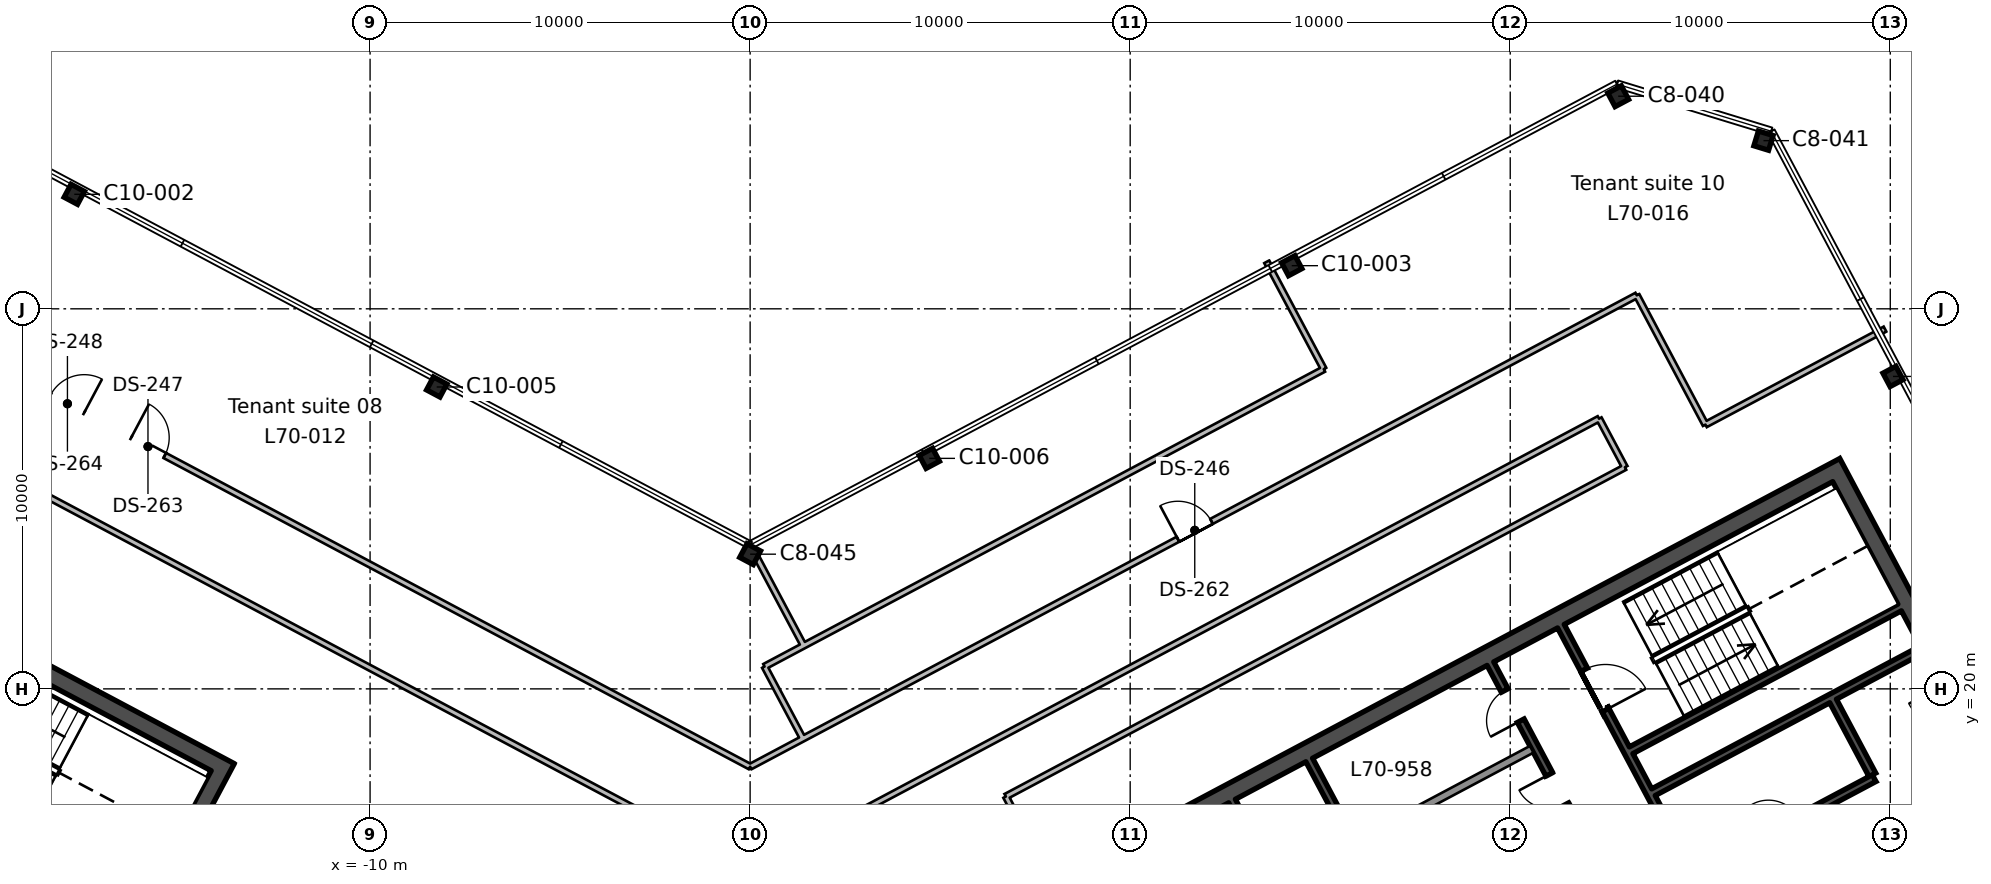
"""IFC4 building model, lengths in metres.
Left out: names, types, materials, properties, quantities, classifications, styles, units other than length and angle.
Written with IfcOpenShell. Run it as: python <this file> out.ifc"""

import sys

from ifc_helpers import new_model, si_unit, direction, frame, frame_2d, origin, origin_2d, place, context, subcontext, project, spatial, rectangle, i_section, extrude, element, fill, save


model = new_model("IFC4")
c1 = context("Model", 3, precision=1e-05, world=origin(), true_north=direction((0.0, 1.0)))
c2 = subcontext(c1, "Body", "Model", "MODEL_VIEW")
j1 = project(units=[si_unit("LENGTHUNIT", "METRE"), si_unit("PLANEANGLEUNIT", "RADIAN")], contexts=[c1])
p1 = place(None, origin())
s1 = spatial("IfcSite", under=j1, at=p1, CompositionType="ELEMENT")
p2 = place(p1, origin())
s2 = spatial("IfcBuilding", under=s1, at=p2, CompositionType="ELEMENT")
p3 = place(p2, frame((0.0, 0.0, 308.7)))
s3 = spatial("IfcBuildingStorey", under=s2, at=p3, CompositionType="ELEMENT", Elevation=308.7)
p4 = place(p3, frame((0.0, 23.544, 0.0), z_axis=(0.0, 0.0, 1.0), x_axis=(-0.882947592859, 0.469471562786, 0.0)))
e1 = element("IfcColumn", 1, at=p4, inside=s3, PredefinedType="COLUMN", context=c2, shape_type="SweptSolid", body=[
    extrude(i_section(OverallWidth=0.404, OverallDepth=0.406, WebThickness=0.027, FlangeThickness=0.044, FilletRadius=0.015, at=origin_2d()), origin(), (0.0, 0.0, 1.0), 3.9),
])
for number, where, z_axis, x_axis in (
    (2, (4.715, 26.065, 0.0), (0.0, 0.0, 1.0), (-0.883, -0.469, 0.0)),
    (3, (-8.247, 27.943, 0.0), (0.0, 0.0, 1.0), (-0.883, 0.469, 0.0)),
    (4, (30.071, 28.221, 0.0), (0.0, 0.0, 1.0), (-0.469, 0.883, 0.0)),
    (5, (14.251, 31.135, 0.0), (0.0, 0.0, 1.0), (-0.883, -0.469, 0.0)),
    (6, (-17.783, 33.013, 0.0), (0.0, 0.0, 1.0), (-0.883, 0.469, 0.0)),
):
    element("IfcColumn", number, at=place(p3, frame(where, z_axis=z_axis, x_axis=x_axis)), inside=s3, PredefinedType="COLUMN", context=c2, shape_type="SweptSolid", body=[
        extrude(i_section(OverallWidth=0.399, OverallDepth=0.386, WebThickness=0.021, FlangeThickness=0.033, FilletRadius=0.015, at=origin_2d()), origin(), (0.0, 0.0, 1.0), 3.9),
    ])
for number, where, z_axis, x_axis in (
    (7, (26.664, 34.425, 0.0), (0.0, 0.0, 1.0), (-0.956, 0.292, 0.0)),
    (8, (22.841, 35.594, 0.0), (0.0, 0.0, 1.0), (-0.883, -0.469, 0.0)),
):
    element("IfcColumn", number, at=place(p3, frame(where, z_axis=z_axis, x_axis=x_axis)), inside=s3, PredefinedType="COLUMN", context=c2, shape_type="SweptSolid", body=[
        extrude(i_section(OverallWidth=0.404, OverallDepth=0.406, WebThickness=0.027, FlangeThickness=0.044, FilletRadius=0.015, at=origin_2d()), origin(), (0.0, 0.0, 1.0), 3.9),
    ])
p5 = place(p3, frame((-13.771, 18.138, 0.0), z_axis=(0.0, 0.0, 1.0), x_axis=(-0.469467968382, -0.882949504028, 0.0)))
e9 = element("IfcWall", 9, at=p5, inside=s3, PredefinedType="SHEAR", context=c2, shape_type="SweptSolid", body=[
    extrude(rectangle(XDim=19.1, YDim=0.45, at=frame_2d((9.55, 0.0))), origin(), (0.0, 0.0, 1.0), 3.9),
])
p6 = place(p5, frame((6.55, 0.0, 0.0)))
e10 = element("IfcOpeningElement", 10, at=p6, cuts=e9, PredefinedType="OPENING", context=c2, shape_type="SweptSolid", body=[
    extrude(rectangle(XDim=2.4, YDim=2.4, at=frame_2d((1.2, 1.2))), frame((0.0, 0.235, 0.0), z_axis=(0.0, -1.0, 0.0), x_axis=(1.0, 0.0, 0.0)), (0.0, 0.0, 1.0), 0.47),
])
p7 = place(p3, frame((-14.076, 18.045, 0.0), z_axis=(0.0, 0.0, 1.0), x_axis=(-0.882947755831, 0.46947125628, 0.0)))
e11 = element("IfcWall", 11, at=p7, inside=s3, PredefinedType="SHEAR", context=c2, shape_type="SweptSolid", body=[
    extrude(rectangle(XDim=20.2, YDim=0.45, at=frame_2d((10.1, 0.0))), origin(), (0.0, 0.0, 1.0), 3.9),
])
p8 = place(p3, frame((-15.942, 14.536, 0.0), z_axis=(0.0, 0.0, 1.0), x_axis=(-0.882946947542, 0.469472776449, 0.0)))
e12 = element("IfcWall", 12, at=p8, inside=s3, PredefinedType="SHEAR", context=c2, shape_type="SweptSolid", body=[
    extrude(rectangle(XDim=8.0, YDim=0.2, at=frame_2d((4.0, 0.0))), origin(), (0.0, 0.0, 1.0), 3.9),
])
p9 = place(p3, frame((-16.529, 13.432, 0.0), z_axis=(0.0, 0.0, 1.0), x_axis=(-0.88295287151, 0.469461634952, 0.0)))
e13 = element("IfcWall", 13, at=p9, inside=s3, PredefinedType="SHEAR", context=c2, shape_type="SweptSolid", body=[
    extrude(rectangle(XDim=8.0, YDim=0.2, at=frame_2d((4.0, 0.0))), origin(), (0.0, 0.0, 1.0), 3.9),
])
p10 = place(p3, frame((37.439, 9.091, 0.0), z_axis=(0.0, 0.0, 1.0), x_axis=(-0.469467968382, 0.882949504028, 0.0)))
e14 = element("IfcWall", 14, at=p10, inside=s3, PredefinedType="SHEAR", context=c2, shape_type="SweptSolid", body=[
    extrude(rectangle(XDim=19.1, YDim=0.45, at=frame_2d((9.55, 0.0))), origin(), (0.0, 0.0, 1.0), 3.9),
])
p11 = place(p10, frame((10.15, 0.0, 0.0)))
e15 = element("IfcOpeningElement", 15, at=p11, cuts=e14, PredefinedType="OPENING", context=c2, shape_type="SweptSolid", body=[
    extrude(rectangle(XDim=2.4, YDim=2.4, at=frame_2d((1.2, 1.2))), frame((0.0, 0.235, 0.0), z_axis=(0.0, -1.0, 0.0), x_axis=(1.0, 0.0, 0.0)), (0.0, 0.0, 1.0), 0.47),
])
p12 = place(p3, frame((10.544, 16.167, 0.0), z_axis=(0.0, 0.0, 1.0), x_axis=(0.882947755831, 0.46947125628, 0.0)))
e16 = element("IfcWall", 16, at=p12, inside=s3, PredefinedType="SHEAR", context=c2, shape_type="SweptSolid", body=[
    extrude(rectangle(XDim=20.2, YDim=0.45, at=frame_2d((10.1, 0.0))), origin(), (0.0, 0.0, 1.0), 3.9),
])
p13 = place(p3, frame((14.394, 13.826, 0.0), z_axis=(0.0, 0.0, 1.0), x_axis=(-0.469494272526, 0.882935517501, 0.0)))
e17 = element("IfcWall", 17, at=p13, inside=s3, PredefinedType="SHEAR", context=c2, shape_type="SweptSolid", body=[
    extrude(rectangle(XDim=3.65, YDim=0.2, at=frame_2d((1.825, 0.0))), origin(), (0.0, 0.0, 1.0), 3.9),
])
p14 = place(p3, frame((18.138, 11.683, 0.0), z_axis=(0.0, 0.0, 1.0), x_axis=(-0.469480409012, 0.88294288918, 0.0)))
e18 = element("IfcWall", 18, at=p14, inside=s3, PredefinedType="SHEAR", context=c2, shape_type="SweptSolid", body=[
    extrude(rectangle(XDim=7.3, YDim=0.2, at=frame_2d((3.65, 0.0))), origin(), (0.0, 0.0, 1.0), 3.9),
])
p15 = place(p3, frame((22.906, 14.218, 0.0), z_axis=(0.0, 0.0, 1.0), x_axis=(-0.469480409012, 0.88294288918, 0.0)))
e19 = element("IfcWall", 19, at=p15, inside=s3, PredefinedType="SHEAR", context=c2, shape_type="SweptSolid", body=[
    extrude(rectangle(XDim=7.3, YDim=0.2, at=frame_2d((3.65, 0.0))), origin(), (0.0, 0.0, 1.0), 3.9),
])
p16 = place(p15, frame((3.1, 0.0, 0.0)))
e20 = element("IfcOpeningElement", 20, at=p16, cuts=e19, PredefinedType="OPENING", context=c2, shape_type="SweptSolid", body=[
    extrude(rectangle(XDim=0.9, YDim=2.1, at=frame_2d((0.45, 1.05))), frame((0.0, 0.11, 0.0), z_axis=(0.0, -1.0, 0.0), x_axis=(1.0, 0.0, 0.0)), (0.0, 0.0, 1.0), 0.22),
])
p17 = place(p15, frame((5.6, 0.0, 0.0)))
e21 = element("IfcOpeningElement", 21, at=p17, cuts=e19, PredefinedType="OPENING", context=c2, shape_type="SweptSolid", body=[
    extrude(rectangle(XDim=0.9, YDim=2.1, at=frame_2d((0.45, 1.05))), frame((0.0, 0.11, 0.0), z_axis=(0.0, -1.0, 0.0), x_axis=(1.0, 0.0, 0.0)), (0.0, 0.0, 1.0), 0.22),
])
p18 = place(p3, frame((24.76, 15.204, 0.0), z_axis=(0.0, 0.0, 1.0), x_axis=(-0.469494272526, 0.882935517501, 0.0)))
e22 = element("IfcWall", 22, at=p18, inside=s3, PredefinedType="SHEAR", context=c2, shape_type="SweptSolid", body=[
    extrude(rectangle(XDim=7.3, YDim=0.2, at=frame_2d((3.65, 0.0))), origin(), (0.0, 0.0, 1.0), 3.9),
])
p19 = place(p18, frame((4.8, 0.0, 0.0)))
e23 = element("IfcOpeningElement", 23, at=p19, cuts=e22, PredefinedType="OPENING", context=c2, shape_type="SweptSolid", body=[
    extrude(rectangle(XDim=1.2, YDim=2.1, at=frame_2d((0.6, 1.05))), frame((0.0, 0.11, 0.0), z_axis=(0.0, -1.0, 0.0), x_axis=(1.0, 0.0, 0.0)), (0.0, 0.0, 1.0), 0.22),
])
p20 = place(p3, frame((29.528, 17.739, 0.0), z_axis=(0.0, 0.0, 1.0), x_axis=(-0.469401318492, 0.882984938828, 0.0)))
e24 = element("IfcWall", 24, at=p20, inside=s3, PredefinedType="SHEAR", context=c2, shape_type="SweptSolid", body=[
    extrude(rectangle(XDim=2.2, YDim=0.2, at=frame_2d((1.1, 0.0))), origin(), (0.0, 0.0, 1.0), 3.9),
])
p21 = place(p3, frame((24.807, 15.116, 0.0), z_axis=(0.0, 0.0, 1.0), x_axis=(0.882942972946, 0.469480251476, 0.0)))
e25 = element("IfcWall", 25, at=p21, inside=s3, PredefinedType="SHEAR", context=c2, shape_type="SweptSolid", body=[
    extrude(rectangle(XDim=5.4, YDim=0.2, at=frame_2d((2.7, 0.0))), origin(), (0.0, 0.0, 1.0), 3.9),
])
p22 = place(p21, frame((2.25, 0.0, 0.0)))
e26 = element("IfcOpeningElement", 26, at=p22, cuts=e25, PredefinedType="OPENING", context=c2, shape_type="SweptSolid", body=[
    extrude(rectangle(XDim=0.9, YDim=2.1, at=frame_2d((0.45, 1.05))), frame((0.0, 0.11, 0.0), z_axis=(0.0, -1.0, 0.0), x_axis=(1.0, 0.0, 0.0)), (0.0, 0.0, 1.0), 0.22),
])
p23 = place(p3, frame((23.769, 17.282, 0.0), z_axis=(0.0, 0.0, 1.0), x_axis=(0.882940221191, 0.469485426614, 0.0)))
e27 = element("IfcWall", 27, at=p23, inside=s3, PredefinedType="SHEAR", context=c2, shape_type="SweptSolid", body=[
    extrude(rectangle(XDim=8.0, YDim=0.2, at=frame_2d((4.0, 0.0))), origin(), (0.0, 0.0, 1.0), 3.9),
])
p24 = place(p3, frame((23.182, 18.385, 0.0), z_axis=(0.0, 0.0, 1.0), x_axis=(0.88295287151, 0.469461634952, 0.0)))
e28 = element("IfcWall", 28, at=p24, inside=s3, PredefinedType="SHEAR", context=c2, shape_type="SweptSolid", body=[
    extrude(rectangle(XDim=8.0, YDim=0.2, at=frame_2d((4.0, 0.0))), origin(), (0.0, 0.0, 1.0), 3.9),
])
p25 = place(p3, frame((15.973, 15.968, 0.0), z_axis=(0.0, 0.0, 1.0), x_axis=(0.882953967957, 0.469459572775, 0.0)))
e29 = element("IfcWall", 29, at=p25, inside=s3, PredefinedType="SOLIDWALL", context=c2, shape_type="SweptSolid", body=[
    extrude(rectangle(XDim=5.2, YDim=0.2, at=frame_2d((2.6, 0.0))), origin(), (0.0, 0.0, 1.0), 3.9),
])
p26 = place(p3, frame((-32.541, 32.535, 0.0), z_axis=(0.0, 0.0, 1.0), x_axis=(0.882951675281, -0.469463884787, 0.0)))
e30 = element("IfcWall", 30, at=p26, inside=s3, PredefinedType="PARTITIONING", context=c2, shape_type="SweptSolid", body=[
    extrude(rectangle(XDim=36.855, YDim=0.15, at=frame_2d((18.427, 0.0))), origin(), (0.0, 0.0, 1.0), 3.54),
])
p27 = place(p3, frame((0.0, 15.233, 0.0), z_axis=(0.0, 0.0, 1.0), x_axis=(0.882940229487, 0.469485411012, 0.0)))
e31 = element("IfcWall", 31, at=p27, inside=s3, PredefinedType="PARTITIONING", context=c2, shape_type="SweptSolid", body=[
    extrude(rectangle(XDim=25.298, YDim=0.15, at=frame_2d((12.649, 0.0))), origin(), (0.0, 0.0, 1.0), 3.54),
])
p28 = place(p3, frame((22.337, 27.11, 0.0), z_axis=(0.0, 0.0, 1.0), x_axis=(0.46976654726, -0.882790683614, 0.0)))
e32 = element("IfcWall", 32, at=p28, inside=s3, PredefinedType="PARTITIONING", context=c2, shape_type="SweptSolid", body=[
    extrude(rectangle(XDim=1.45, YDim=0.15, at=frame_2d((0.725, 0.0))), origin(), (0.0, 0.0, 1.0), 3.54),
])
p29 = place(p3, frame((23.018, 25.83, 0.0), z_axis=(0.0, 0.0, 1.0), x_axis=(-0.882935416105, -0.469494463213, 0.0)))
e33 = element("IfcWall", 33, at=p29, inside=s3, PredefinedType="PARTITIONING", context=c2, shape_type="SweptSolid", body=[
    extrude(rectangle(XDim=18.45, YDim=0.15, at=frame_2d((9.225, 0.0))), origin(), (0.0, 0.0, 1.0), 3.54),
])
p30 = place(p3, frame((6.728, 17.168, 0.0), z_axis=(0.0, 0.0, 1.0), x_axis=(0.469325262013, -0.883025366813, 0.0)))
e34 = element("IfcWall", 34, at=p30, inside=s3, PredefinedType="PARTITIONING", context=c2, shape_type="SweptSolid", body=[
    extrude(rectangle(XDim=3.814, YDim=0.15, at=frame_2d((1.907, 0.0))), origin(), (0.0, 0.0, 1.0), 3.54),
])
p31 = place(p3, frame((-31.693, 34.803, 0.0), z_axis=(0.0, 0.0, 1.0), x_axis=(0.882941558982, -0.469482910683, 0.0)))
e35 = element("IfcWall", 35, at=p31, inside=s3, PredefinedType="PARTITIONING", context=c2, shape_type="SweptSolid", body=[
    extrude(rectangle(XDim=35.895, YDim=0.15, at=frame_2d((17.948, 0.0))), origin(), (0.0, 0.0, 1.0), 3.54),
])
p32 = place(p31, frame((17.45, 0.0, 0.0)))
e36 = element("IfcOpeningElement", 36, at=p32, cuts=e35, PredefinedType="OPENING", context=c2, shape_type="SweptSolid", body=[
    extrude(rectangle(XDim=1.0, YDim=2.1, at=frame_2d((0.5, 1.05))), frame((0.0, 0.085, 0.0), z_axis=(0.0, -1.0, 0.0), x_axis=(1.0, 0.0, 0.0)), (0.0, 0.0, 1.0), 0.17),
])
p33 = place(p31, frame((15.05, 0.0, 0.0)))
e37 = element("IfcOpeningElement", 37, at=p33, cuts=e35, PredefinedType="OPENING", context=c2, shape_type="SweptSolid", body=[
    extrude(rectangle(XDim=1.0, YDim=2.1, at=frame_2d((0.5, 1.05))), frame((0.0, 0.085, 0.0), z_axis=(0.0, -1.0, 0.0), x_axis=(1.0, 0.0, 0.0)), (0.0, 0.0, 1.0), 0.17),
])
p34 = place(p3, frame((0.0, 17.951, 0.0), z_axis=(0.0, 0.0, 1.0), x_axis=(0.882944349917, 0.469477661821, 0.0)))
e38 = element("IfcWall", 38, at=p34, inside=s3, PredefinedType="PARTITIONING", context=c2, shape_type="SweptSolid", body=[
    extrude(rectangle(XDim=26.423, YDim=0.15, at=frame_2d((13.211, 0.0))), origin(), (0.0, 0.0, 1.0), 3.54),
])
p35 = place(p34, frame((12.75, 0.0, 0.0)))
e39 = element("IfcOpeningElement", 39, at=p35, cuts=e38, PredefinedType="OPENING", context=c2, shape_type="SweptSolid", body=[
    extrude(rectangle(XDim=1.0, YDim=2.1, at=frame_2d((0.5, 1.05))), frame((0.0, 0.085, 0.0), z_axis=(0.0, -1.0, 0.0), x_axis=(1.0, 0.0, 0.0)), (0.0, 0.0, 1.0), 0.17),
])
p36 = place(p3, frame((-14.844, 31.903, 0.0), z_axis=(0.0, 0.0, 1.0), x_axis=(-0.469344284682, -0.883015256061, 0.0)))
e40 = element("IfcWall", 40, at=p36, inside=s3, PredefinedType="PARTITIONING", context=c2, shape_type="SweptSolid", body=[
    extrude(rectangle(XDim=5.35, YDim=0.15, at=frame_2d((2.675, 0.0))), origin(), (0.0, 0.0, 1.0), 3.54),
])
p37 = place(p3, frame((0.178, 23.45, 0.0), z_axis=(0.0, 0.0, 1.0), x_axis=(0.469495603372, -0.882934809833, 0.0)))
e41 = element("IfcWall", 41, at=p37, inside=s3, PredefinedType="PARTITIONING", context=c2, shape_type="SweptSolid", body=[
    extrude(rectangle(XDim=2.622, YDim=0.15, at=frame_2d((1.311, 0.0))), origin(), (0.0, 0.0, 1.0), 3.54),
])
p38 = place(p3, frame((1.404, 21.133, 0.0), z_axis=(0.0, 0.0, 1.0), x_axis=(-0.882568125156, -0.47018454298, 0.0)))
e42 = element("IfcWall", 42, at=p38, inside=s3, PredefinedType="PARTITIONING", context=c2, shape_type="SweptSolid", body=[
    extrude(rectangle(XDim=1.162, YDim=0.15, at=frame_2d((0.581, 0.0))), origin(), (0.0, 0.0, 1.0), 3.54),
])
p39 = place(p3, frame((1.36, 18.742, 0.0), z_axis=(0.0, 0.0, 1.0), x_axis=(-0.469357296394, 0.883008339894, 0.0)))
e43 = element("IfcWall", 43, at=p39, inside=s3, PredefinedType="PARTITIONING", context=c2, shape_type="SweptSolid", body=[
    extrude(rectangle(XDim=2.091, YDim=0.15, at=frame_2d((1.045, 0.0))), origin(), (0.0, 0.0, 1.0), 3.54),
])
p40 = place(p3, frame((1.404, 21.133, 0.0), z_axis=(0.0, 0.0, 1.0), x_axis=(0.882961961034, 0.469444539182, 0.0)))
e44 = element("IfcWall", 44, at=p40, inside=s3, PredefinedType="PARTITIONING", context=c2, shape_type="SweptSolid", body=[
    extrude(rectangle(XDim=15.506, YDim=0.15, at=frame_2d((7.753, 0.0))), origin(), (0.0, 0.0, 1.0), 3.54),
])
p41 = place(p3, frame((15.095, 28.412, 0.0), z_axis=(0.0, 0.0, 1.0), x_axis=(-0.469320691295, 0.883027796121, 0.0)))
e45 = element("IfcWall", 45, at=p41, inside=s3, PredefinedType="PARTITIONING", context=c2, shape_type="SweptSolid", body=[
    extrude(rectangle(XDim=3.2, YDim=0.15, at=frame_2d((1.6, 0.0))), origin(), (0.0, 0.0, 1.0), 3.54),
])
p42 = place(p3, frame((29.862, 29.466, 0.0), z_axis=(0.0, 0.0, 1.0), x_axis=(-0.882849858528, -0.469655328191, 0.0)))
e46 = element("IfcWall", 46, at=p42, inside=s3, PredefinedType="PARTITIONING", context=c2, shape_type="SweptSolid", body=[
    extrude(rectangle(XDim=5.353, YDim=0.15, at=frame_2d((2.677, 0.0))), origin(), (0.0, 0.0, 1.0), 3.54),
])
p43 = place(p3, frame((25.136, 26.952, 0.0), z_axis=(0.0, 0.0, 1.0), x_axis=(-0.468650225043, 0.883383816111, 0.0)))
e47 = element("IfcWall", 47, at=p43, inside=s3, PredefinedType="PARTITIONING", context=c2, shape_type="SweptSolid", body=[
    extrude(rectangle(XDim=3.854, YDim=0.15, at=frame_2d((1.927, 0.0))), origin(), (0.0, 0.0, 1.0), 3.54),
])
p44 = place(p19, frame((1.2, 0.0, 0.0), z_axis=(0.0, 0.0, 1.0), x_axis=(-1.0, 0.0, 0.0)))
e48 = element("IfcDoor", 48, at=p44, inside=s3, OperationType="SINGLE_SWING_RIGHT", PredefinedType="DOOR", context=c2, shape_type="SweptSolid", body=[
    extrude(rectangle(XDim=1.2, YDim=2.1, at=frame_2d((0.6, 1.05))), frame((0.0, 0.025, 0.0), z_axis=(0.0, -1.0, 0.0), x_axis=(1.0, 0.0, 0.0)), (0.0, 0.0, 1.0), 0.05),
])
fill(e23, e48)
p45 = place(p16, origin())
e49 = element("IfcDoor", 49, at=p45, inside=s3, OperationType="SINGLE_SWING_RIGHT", PredefinedType="DOOR", context=c2, shape_type="SweptSolid", body=[
    extrude(rectangle(XDim=0.9, YDim=2.1, at=frame_2d((0.45, 1.05))), frame((0.0, 0.025, 0.0), z_axis=(0.0, -1.0, 0.0), x_axis=(1.0, 0.0, 0.0)), (0.0, 0.0, 1.0), 0.05),
])
fill(e20, e49)
p46 = place(p17, origin())
e50 = element("IfcDoor", 50, at=p46, inside=s3, OperationType="SINGLE_SWING_LEFT", PredefinedType="DOOR", context=c2, shape_type="SweptSolid", body=[
    extrude(rectangle(XDim=0.9, YDim=2.1, at=frame_2d((0.45, 1.05))), frame((0.0, 0.025, 0.0), z_axis=(0.0, -1.0, 0.0), x_axis=(1.0, 0.0, 0.0)), (0.0, 0.0, 1.0), 0.05),
])
fill(e21, e50)
p47 = place(p35, origin())
e51 = element("IfcDoor", 51, at=p47, inside=s3, OperationType="SINGLE_SWING_LEFT", PredefinedType="DOOR", context=c2, shape_type="SweptSolid", body=[
    extrude(rectangle(XDim=1.0, YDim=2.1, at=frame_2d((0.5, 1.05))), frame((0.0, 0.025, 0.0), z_axis=(0.0, -1.0, 0.0), x_axis=(1.0, 0.0, 0.0)), (0.0, 0.0, 1.0), 0.05),
])
fill(e39, e51)
p48 = place(p32, origin())
e52 = element("IfcDoor", 52, at=p48, inside=s3, OperationType="SINGLE_SWING_LEFT", PredefinedType="DOOR", context=c2, shape_type="SweptSolid", body=[
    extrude(rectangle(XDim=1.0, YDim=2.1, at=frame_2d((0.5, 1.05))), frame((0.0, 0.025, 0.0), z_axis=(0.0, -1.0, 0.0), x_axis=(1.0, 0.0, 0.0)), (0.0, 0.0, 1.0), 0.05),
])
fill(e36, e52)
p49 = place(p33, origin())
e53 = element("IfcDoor", 53, at=p49, inside=s3, OperationType="SINGLE_SWING_RIGHT", PredefinedType="DOOR", context=c2, shape_type="SweptSolid", body=[
    extrude(rectangle(XDim=1.0, YDim=2.1, at=frame_2d((0.5, 1.05))), frame((0.0, 0.025, 0.0), z_axis=(0.0, -1.0, 0.0), x_axis=(1.0, 0.0, 0.0)), (0.0, 0.0, 1.0), 0.05),
])
fill(e37, e53)
save(model, sys.argv[1])
